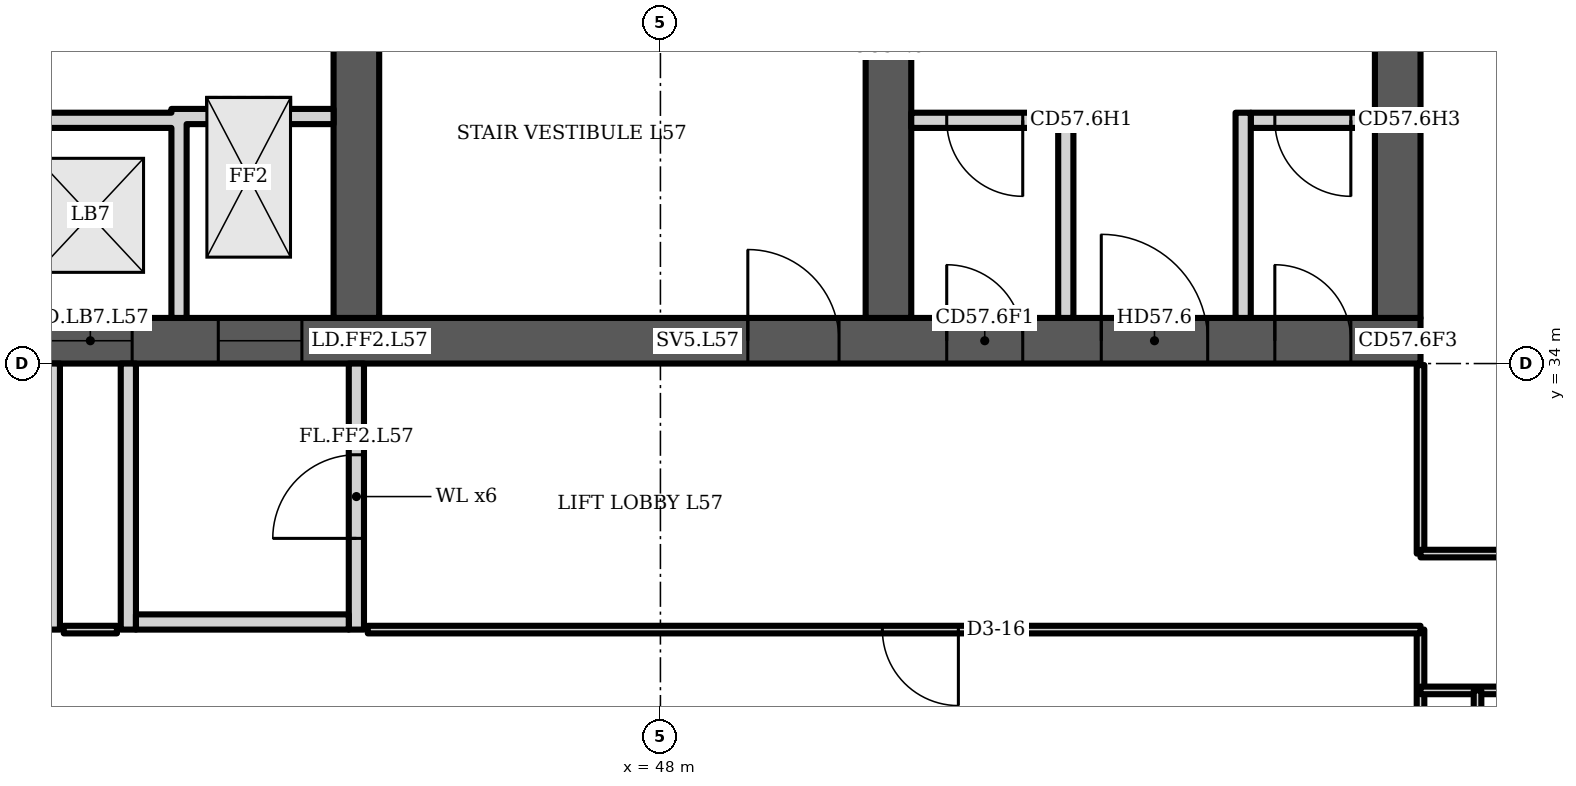
"""IFC4 building model, lengths in metres.
Left out: names, types, materials, properties, quantities, classifications, styles, units other than length and angle.
Written with IfcOpenShell. Run it as: python <this file> out.ifc"""

import sys

from ifc_helpers import new_model, si_unit, direction, frame, frame_2d, origin, place, context, subcontext, project, spatial, polyline, rectangle, outline, extrude, element, fill, save


model = new_model("IFC4")
c1 = context("Model", 3, precision=1e-05, world=origin(), true_north=direction((0.0, 1.0)))
c2 = subcontext(c1, "Body", "Model", "MODEL_VIEW")
j1 = project(units=[si_unit("LENGTHUNIT", "METRE"), si_unit("PLANEANGLEUNIT", "RADIAN")], contexts=[c1])
p1 = place(None, origin())
s1 = spatial("IfcSite", under=j1, at=p1, CompositionType="ELEMENT")
p2 = place(p1, origin())
s2 = spatial("IfcBuilding", under=s1, at=p2, CompositionType="ELEMENT")
p3 = place(p2, frame((0.0, 0.0, 228.7)))
s3 = spatial("IfcBuildingStorey", under=s2, at=p3, CompositionType="ELEMENT", Elevation=228.7)
p4 = place(p3, frame((23.0, 34.3, 0.0), z_axis=(0.0, 0.0, 1.0), x_axis=(1.0, 0.0, 0.0)))
e1 = element("IfcWall", 1, at=p4, inside=s3, PredefinedType="SHEAR", context=c2, shape_type="SweptSolid", body=[
    extrude(rectangle(XDim=35.0, YDim=0.6, at=frame_2d((17.5, 0.0))), origin(), (0.0, 0.0, 1.0), 3.6),
])
p5 = place(p4, frame((0.65, 0.0, 0.0)))
e2 = element("IfcOpeningElement", 2, at=p5, cuts=e1, PredefinedType="OPENING", context=c2, shape_type="SweptSolid", body=[
    extrude(rectangle(XDim=1.2, YDim=2.1, at=frame_2d((0.6, 1.05))), frame((0.0, 0.31, 0.0), z_axis=(0.0, -1.0, 0.0), x_axis=(1.0, 0.0, 0.0)), (0.0, 0.0, 1.0), 0.62),
])
p6 = place(p4, frame((7.717, 0.0, 0.0)))
e3 = element("IfcOpeningElement", 3, at=p6, cuts=e1, PredefinedType="OPENING", context=c2, shape_type="SweptSolid", body=[
    extrude(rectangle(XDim=1.1, YDim=2.1, at=frame_2d((0.55, 1.05))), frame((0.0, 0.31, 0.0), z_axis=(0.0, -1.0, 0.0), x_axis=(1.0, 0.0, 0.0)), (0.0, 0.0, 1.0), 0.62),
])
p7 = place(p4, frame((12.183, 0.0, 0.0)))
e4 = element("IfcOpeningElement", 4, at=p7, cuts=e1, PredefinedType="OPENING", context=c2, shape_type="SweptSolid", body=[
    extrude(rectangle(XDim=1.1, YDim=2.1, at=frame_2d((0.55, 1.05))), frame((0.0, 0.31, 0.0), z_axis=(0.0, -1.0, 0.0), x_axis=(1.0, 0.0, 0.0)), (0.0, 0.0, 1.0), 0.62),
])
p8 = place(p4, frame((9.8, 0.0, 0.0)))
e5 = element("IfcOpeningElement", 5, at=p8, cuts=e1, PredefinedType="OPENING", context=c2, shape_type="SweptSolid", body=[
    extrude(rectangle(XDim=1.4, YDim=2.1, at=frame_2d((0.7, 1.05))), frame((0.0, 0.31, 0.0), z_axis=(0.0, -1.0, 0.0), x_axis=(1.0, 0.0, 0.0)), (0.0, 0.0, 1.0), 0.62),
])
p9 = place(p4, frame((14.717, 0.0, 0.0)))
e6 = element("IfcOpeningElement", 6, at=p9, cuts=e1, PredefinedType="OPENING", context=c2, shape_type="SweptSolid", body=[
    extrude(rectangle(XDim=1.1, YDim=2.1, at=frame_2d((0.55, 1.05))), frame((0.0, 0.31, 0.0), z_axis=(0.0, -1.0, 0.0), x_axis=(1.0, 0.0, 0.0)), (0.0, 0.0, 1.0), 0.62),
])
p10 = place(p4, frame((16.95, 0.0, 0.0)))
e7 = element("IfcOpeningElement", 7, at=p10, cuts=e1, PredefinedType="OPENING", context=c2, shape_type="SweptSolid", body=[
    extrude(rectangle(XDim=1.1, YDim=2.1, at=frame_2d((0.55, 1.05))), frame((0.0, 0.31, 0.0), z_axis=(0.0, -1.0, 0.0), x_axis=(1.0, 0.0, 0.0)), (0.0, 0.0, 1.0), 0.62),
])
p11 = place(p4, frame((19.183, 0.0, 0.0)))
e8 = element("IfcOpeningElement", 8, at=p11, cuts=e1, PredefinedType="OPENING", context=c2, shape_type="SweptSolid", body=[
    extrude(rectangle(XDim=1.1, YDim=2.1, at=frame_2d((0.55, 1.05))), frame((0.0, 0.31, 0.0), z_axis=(0.0, -1.0, 0.0), x_axis=(1.0, 0.0, 0.0)), (0.0, 0.0, 1.0), 0.62),
])
p12 = place(p4, frame((26.15, 0.0, 0.0)))
e9 = element("IfcOpeningElement", 9, at=p12, cuts=e1, PredefinedType="OPENING", context=c2, shape_type="SweptSolid", body=[
    extrude(rectangle(XDim=1.2, YDim=2.1, at=frame_2d((0.6, 1.05))), frame((0.0, 0.31, 0.0), z_axis=(0.0, -1.0, 0.0), x_axis=(1.0, 0.0, 0.0)), (0.0, 0.0, 1.0), 0.62),
])
p13 = place(p4, frame((28.767, 0.0, 0.0)))
e10 = element("IfcOpeningElement", 10, at=p13, cuts=e1, PredefinedType="OPENING", context=c2, shape_type="SweptSolid", body=[
    extrude(rectangle(XDim=1.0, YDim=2.1, at=frame_2d((0.5, 1.05))), frame((0.0, 0.31, 0.0), z_axis=(0.0, -1.0, 0.0), x_axis=(1.0, 0.0, 0.0)), (0.0, 0.0, 1.0), 0.62),
])
p14 = place(p4, frame((33.083, 0.0, 0.0)))
e11 = element("IfcOpeningElement", 11, at=p14, cuts=e1, PredefinedType="OPENING", context=c2, shape_type="SweptSolid", body=[
    extrude(rectangle(XDim=1.0, YDim=2.1, at=frame_2d((0.5, 1.05))), frame((0.0, 0.31, 0.0), z_axis=(0.0, -1.0, 0.0), x_axis=(1.0, 0.0, 0.0)), (0.0, 0.0, 1.0), 0.62),
])
p15 = place(p4, frame((30.8, 0.0, 0.0)))
e12 = element("IfcOpeningElement", 12, at=p15, cuts=e1, PredefinedType="OPENING", context=c2, shape_type="SweptSolid", body=[
    extrude(rectangle(XDim=1.4, YDim=2.1, at=frame_2d((0.7, 1.05))), frame((0.0, 0.31, 0.0), z_axis=(0.0, -1.0, 0.0), x_axis=(1.0, 0.0, 0.0)), (0.0, 0.0, 1.0), 0.62),
])
p16 = place(p3, frame((44.0, 34.6, 0.0), z_axis=(0.0, 0.0, 1.0), x_axis=(0.0, 1.0, 0.0)))
e13 = element("IfcWall", 13, at=p16, inside=s3, PredefinedType="SHEAR", context=c2, shape_type="SweptSolid", body=[
    extrude(rectangle(XDim=14.784, YDim=0.6, at=frame_2d((7.392, 0.0))), origin(), (0.0, 0.0, 1.0), 3.6),
])
p17 = place(p16, frame((11.608, 0.0, 0.0)))
e14 = element("IfcOpeningElement", 14, at=p17, cuts=e13, PredefinedType="OPENING", context=c2, shape_type="SweptSolid", body=[
    extrude(rectangle(XDim=1.0, YDim=2.1, at=frame_2d((0.5, 1.05))), frame((0.0, 0.31, 0.0), z_axis=(0.0, -1.0, 0.0), x_axis=(1.0, 0.0, 0.0)), (0.0, 0.0, 1.0), 0.62),
])
p18 = place(p16, frame((3.8, 0.0, 0.0)))
e15 = element("IfcOpeningElement", 15, at=p18, cuts=e13, PredefinedType="OPENING", context=c2, shape_type="SweptSolid", body=[
    extrude(rectangle(XDim=1.1, YDim=2.1, at=frame_2d((0.55, 1.05))), frame((0.0, 0.31, 0.0), z_axis=(0.0, -1.0, 0.0), x_axis=(1.0, 0.0, 0.0)), (0.0, 0.0, 1.0), 0.62),
])
p19 = place(p3, frame((51.0, 34.6, 0.0), z_axis=(0.0, 0.0, 1.0), x_axis=(0.0, 1.0, 0.0)))
e16 = element("IfcWall", 16, at=p19, inside=s3, PredefinedType="SHEAR", context=c2, shape_type="SweptSolid", body=[
    extrude(rectangle(XDim=14.171, YDim=0.6, at=frame_2d((7.085, 0.0))), origin(), (0.0, 0.0, 1.0), 3.6),
])
p20 = place(p19, frame((3.8, 0.0, 0.0)))
e17 = element("IfcOpeningElement", 17, at=p20, cuts=e16, PredefinedType="OPENING", context=c2, shape_type="SweptSolid", body=[
    extrude(rectangle(XDim=1.1, YDim=2.1, at=frame_2d((0.55, 1.05))), frame((0.0, 0.31, 0.0), z_axis=(0.0, -1.0, 0.0), x_axis=(1.0, 0.0, 0.0)), (0.0, 0.0, 1.0), 0.62),
])
p21 = place(p3, frame((57.7, 34.6, 0.0), z_axis=(0.0, 0.0, 1.0), x_axis=(0.0, 1.0, 0.0)))
e18 = element("IfcWall", 18, at=p21, inside=s3, PredefinedType="SHEAR", context=c2, shape_type="SweptSolid", body=[
    extrude(rectangle(XDim=13.585, YDim=0.6, at=frame_2d((6.792, 0.0))), origin(), (0.0, 0.0, 1.0), 3.6),
])
p22 = place(p3, frame((0.0, 0.0, -0.0)))
e19 = element("IfcWall", 19, at=p22, inside=s3, PredefinedType="PARTITIONING", context=c2, shape_type="SweptSolid", body=[
    extrude(outline(polyline([(41.567, 37.1), (39.433, 37.1), (39.433, 34.6), (39.233, 34.6), (39.233, 37.45), (37.3, 37.45), (37.3, 37.65), (39.233, 37.65), (39.433, 37.65), (39.433, 37.3), (41.567, 37.3), (41.567, 37.35), (41.767, 37.35), (43.7, 37.35), (43.7, 37.15), (41.767, 37.15), (41.767, 34.6), (41.567, 34.6), (41.567, 37.1)])), origin(), (0.0, 0.0, 1.0), 3.2),
])
p23 = place(p3, frame((51.3, 37.2, 0.0), z_axis=(0.0, 0.0, 1.0), x_axis=(1.0, 0.0, 0.0)))
e20 = element("IfcWall", 20, at=p23, inside=s3, PredefinedType="PARTITIONING", context=c2, shape_type="SweptSolid", body=[
    extrude(rectangle(XDim=1.933, YDim=0.2, at=frame_2d((0.967, 0.0))), origin(), (0.0, 0.0, 1.0), 3.2),
])
p24 = place(p23, frame((0.467, 0.0, 0.0)))
e21 = element("IfcOpeningElement", 21, at=p24, cuts=e20, PredefinedType="OPENING", context=c2, shape_type="SweptSolid", body=[
    extrude(rectangle(XDim=1.0, YDim=2.1, at=frame_2d((0.5, 1.05))), frame((0.0, 0.11, 0.0), z_axis=(0.0, -1.0, 0.0), x_axis=(1.0, 0.0, 0.0)), (0.0, 0.0, 1.0), 0.22),
])
p25 = place(p3, frame((55.767, 37.2, 0.0), z_axis=(0.0, 0.0, 1.0), x_axis=(1.0, 0.0, 0.0)))
e22 = element("IfcWall", 22, at=p25, inside=s3, PredefinedType="PARTITIONING", context=c2, shape_type="SweptSolid", body=[
    extrude(rectangle(XDim=1.633, YDim=0.2, at=frame_2d((0.817, 0.0))), origin(), (0.0, 0.0, 1.0), 3.2),
])
p26 = place(p25, frame((0.317, 0.0, 0.0)))
e23 = element("IfcOpeningElement", 23, at=p26, cuts=e22, PredefinedType="OPENING", context=c2, shape_type="SweptSolid", body=[
    extrude(rectangle(XDim=1.0, YDim=2.1, at=frame_2d((0.5, 1.05))), frame((0.0, 0.11, 0.0), z_axis=(0.0, -1.0, 0.0), x_axis=(1.0, 0.0, 0.0)), (0.0, 0.0, 1.0), 0.22),
])
p27 = place(p3, frame((0.0, 0.0, -0.0)))
e24 = element("IfcWall", 24, at=p27, inside=s3, PredefinedType="PARTITIONING", context=c2, shape_type="SweptSolid", body=[
    extrude(outline(polyline([(53.233, 34.6), (53.233, 37.3), (53.433, 37.3), (53.433, 34.6), (53.233, 34.6)])), origin(), (0.0, 0.0, 1.0), 3.2),
])
p28 = place(p3, frame((0.0, 0.0, -0.0)))
e25 = element("IfcWall", 25, at=p28, inside=s3, PredefinedType="PARTITIONING", context=c2, shape_type="SweptSolid", body=[
    extrude(outline(polyline([(55.567, 34.6), (55.567, 37.3), (55.767, 37.3), (55.767, 34.6), (55.567, 34.6)])), origin(), (0.0, 0.0, 1.0), 3.2),
])
for number, where, z_axis, x_axis in (
    (26, (40.0, 30.5, 0.0), (0.0, 0.0, 1.0), (0.0, 1.0, 0.0)),
    (27, (41.0, 30.5, 0.0), (0.0, 0.0, 1.0), (0.0, 1.0, 0.0)),
):
    element("IfcWall", number, at=place(p3, frame(where, z_axis=z_axis, x_axis=x_axis)), inside=s3, PredefinedType="PARTITIONING", context=c2, shape_type="SweptSolid", body=[
        extrude(rectangle(XDim=3.5, YDim=0.2, at=frame_2d((1.75, 0.0))), origin(), (0.0, 0.0, 1.0), 3.2),
    ])
p29 = place(p3, frame((44.0, 30.5, 0.0), z_axis=(0.0, 0.0, 1.0), x_axis=(0.0, 1.0, 0.0)))
e28 = element("IfcWall", 28, at=p29, inside=s3, PredefinedType="PARTITIONING", context=c2, shape_type="SweptSolid", body=[
    extrude(rectangle(XDim=3.5, YDim=0.2, at=frame_2d((1.75, 0.0))), origin(), (0.0, 0.0, 1.0), 3.2),
])
p30 = place(p29, frame((1.2, 0.0, 0.0)))
e29 = element("IfcOpeningElement", 29, at=p30, cuts=e28, PredefinedType="OPENING", context=c2, shape_type="SweptSolid", body=[
    extrude(rectangle(XDim=1.1, YDim=2.1, at=frame_2d((0.55, 1.05))), frame((0.0, 0.11, 0.0), z_axis=(0.0, -1.0, 0.0), x_axis=(1.0, 0.0, 0.0)), (0.0, 0.0, 1.0), 0.22),
])
p31 = place(p3, frame((41.1, 30.6, 0.0), z_axis=(0.0, 0.0, 1.0), x_axis=(1.0, 0.0, 0.0)))
e30 = element("IfcWall", 30, at=p31, inside=s3, PredefinedType="PARTITIONING", context=c2, shape_type="SweptSolid", body=[
    extrude(rectangle(XDim=2.8, YDim=0.2, at=frame_2d((1.4, 0.0))), origin(), (0.0, 0.0, 1.0), 3.2),
])
p32 = place(p3, frame((40.15, 30.5, 0.0), z_axis=(0.0, 0.0, 1.0), x_axis=(1.0, 0.0, 0.0)))
e31 = element("IfcWall", 31, at=p32, inside=s3, PredefinedType="PARTITIONING", context=c2, shape_type="SweptSolid", body=[
    extrude(rectangle(XDim=0.7, YDim=0.1, at=frame_2d((0.35, 0.0))), origin(), (0.0, 0.0, 1.0), 3.2),
])
p33 = place(p3, frame((58.0, 17.0, 0.0), z_axis=(0.0, 0.0, 1.0), x_axis=(0.0, 1.0, 0.0)))
e32 = element("IfcWall", 32, at=p33, inside=s3, PredefinedType="PARTITIONING", context=c2, shape_type="SweptSolid", body=[
    extrude(rectangle(XDim=13.5, YDim=0.1, at=frame_2d((6.75, 0.0))), origin(), (0.0, 0.0, 1.0), 3.2),
])
p34 = place(p3, frame((58.0, 29.7, 0.0), z_axis=(0.0, 0.0, 1.0), x_axis=(1.0, 0.0, 0.0)))
e33 = element("IfcWall", 33, at=p34, inside=s3, PredefinedType="PARTITIONING", context=c2, shape_type="SweptSolid", body=[
    extrude(rectangle(XDim=3.58, YDim=0.1, at=frame_2d((1.79, 0.0))), origin(), (0.0, 0.0, 1.0), 3.2),
])
p35 = place(p3, frame((58.0, 31.5, 0.0), z_axis=(0.0, 0.0, 1.0), x_axis=(0.0, 1.0, 0.0)))
e34 = element("IfcWall", 34, at=p35, inside=s3, PredefinedType="PARTITIONING", context=c2, shape_type="SweptSolid", body=[
    extrude(rectangle(XDim=2.48, YDim=0.1, at=frame_2d((1.24, 0.0))), origin(), (0.0, 0.0, 1.0), 3.2),
])
p36 = place(p3, frame((58.0, 31.5, 0.0), z_axis=(0.0, 0.0, 1.0), x_axis=(1.0, 0.0, 0.0)))
e35 = element("IfcWall", 35, at=p36, inside=s3, PredefinedType="PARTITIONING", context=c2, shape_type="SweptSolid", body=[
    extrude(rectangle(XDim=5.38, YDim=0.1, at=frame_2d((2.69, 0.0))), origin(), (0.0, 0.0, 1.0), 3.2),
])
p37 = place(p36, frame((4.135, 0.0, 0.0)))
e36 = element("IfcOpeningElement", 36, at=p37, cuts=e35, PredefinedType="OPENING", context=c2, shape_type="SweptSolid", body=[
    extrude(rectangle(XDim=1.0, YDim=2.1, at=frame_2d((0.5, 1.05))), frame((0.0, 0.06, 0.0), z_axis=(0.0, -1.0, 0.0), x_axis=(1.0, 0.0, 0.0)), (0.0, 0.0, 1.0), 0.12),
])
p38 = place(p3, frame((58.75, 23.35, 0.0), z_axis=(0.0, 0.0, 1.0), x_axis=(0.0, 1.0, 0.0)))
e37 = element("IfcWall", 37, at=p38, inside=s3, PredefinedType="PARTITIONING", context=c2, shape_type="SweptSolid", body=[
    extrude(rectangle(XDim=6.35, YDim=0.1, at=frame_2d((3.175, 0.0))), origin(), (0.0, 0.0, 1.0), 3.2),
])
p39 = place(p3, frame((44.15, 30.5, 0.0), z_axis=(0.0, 0.0, 1.0), x_axis=(1.0, 0.0, 0.0)))
e38 = element("IfcWall", 38, at=p39, inside=s3, PredefinedType="PARTITIONING", context=c2, shape_type="SweptSolid", body=[
    extrude(rectangle(XDim=13.85, YDim=0.1, at=frame_2d((6.925, 0.0))), origin(), (0.0, 0.0, 1.0), 3.2),
])
p40 = place(p39, frame((6.77, 0.0, 0.0)))
e39 = element("IfcOpeningElement", 39, at=p40, cuts=e38, PredefinedType="OPENING", context=c2, shape_type="SweptSolid", body=[
    extrude(rectangle(XDim=1.0, YDim=2.1, at=frame_2d((0.5, 1.05))), frame((0.0, 0.06, 0.0), z_axis=(0.0, -1.0, 0.0), x_axis=(1.0, 0.0, 0.0)), (0.0, 0.0, 1.0), 0.12),
])
p41 = place(p10, origin())
e40 = element("IfcDoor", 40, at=p41, inside=s3, OperationType="DOUBLE_DOOR_SLIDING", PredefinedType="DOOR", context=c2, shape_type="SweptSolid", body=[
    extrude(rectangle(XDim=1.1, YDim=2.1, at=frame_2d((0.55, 1.05))), frame((0.0, 0.025, 0.0), z_axis=(0.0, -1.0, 0.0), x_axis=(1.0, 0.0, 0.0)), (0.0, 0.0, 1.0), 0.05),
])
fill(e7, e40)
p42 = place(p11, origin())
e41 = element("IfcDoor", 41, at=p42, inside=s3, OperationType="DOUBLE_DOOR_SLIDING", PredefinedType="DOOR", context=c2, shape_type="SweptSolid", body=[
    extrude(rectangle(XDim=1.1, YDim=2.1, at=frame_2d((0.55, 1.05))), frame((0.0, 0.025, 0.0), z_axis=(0.0, -1.0, 0.0), x_axis=(1.0, 0.0, 0.0)), (0.0, 0.0, 1.0), 0.05),
])
fill(e8, e41)
p43 = place(p12, origin())
e42 = element("IfcDoor", 42, at=p43, inside=s3, OperationType="SINGLE_SWING_LEFT", PredefinedType="DOOR", context=c2, shape_type="SweptSolid", body=[
    extrude(rectangle(XDim=1.2, YDim=2.1, at=frame_2d((0.6, 1.05))), frame((0.0, 0.025, 0.0), z_axis=(0.0, -1.0, 0.0), x_axis=(1.0, 0.0, 0.0)), (0.0, 0.0, 1.0), 0.05),
])
fill(e9, e42)
p44 = place(p13, origin())
e43 = element("IfcDoor", 43, at=p44, inside=s3, OperationType="SINGLE_SWING_LEFT", PredefinedType="DOOR", context=c2, shape_type="SweptSolid", body=[
    extrude(rectangle(XDim=1.0, YDim=2.1, at=frame_2d((0.5, 1.05))), frame((0.0, 0.025, 0.0), z_axis=(0.0, -1.0, 0.0), x_axis=(1.0, 0.0, 0.0)), (0.0, 0.0, 1.0), 0.05),
])
fill(e10, e43)
p45 = place(p24, origin())
e44 = element("IfcDoor", 44, at=p45, inside=s3, OperationType="SINGLE_SWING_RIGHT", PredefinedType="DOOR", context=c2, shape_type="SweptSolid", body=[
    extrude(rectangle(XDim=1.0, YDim=2.1, at=frame_2d((0.5, 1.05))), frame((0.0, 0.025, 0.0), z_axis=(0.0, -1.0, 0.0), x_axis=(1.0, 0.0, 0.0)), (0.0, 0.0, 1.0), 0.05),
])
fill(e21, e44)
p46 = place(p14, origin())
e45 = element("IfcDoor", 45, at=p46, inside=s3, OperationType="SINGLE_SWING_LEFT", PredefinedType="DOOR", context=c2, shape_type="SweptSolid", body=[
    extrude(rectangle(XDim=1.0, YDim=2.1, at=frame_2d((0.5, 1.05))), frame((0.0, 0.025, 0.0), z_axis=(0.0, -1.0, 0.0), x_axis=(1.0, 0.0, 0.0)), (0.0, 0.0, 1.0), 0.05),
])
fill(e11, e45)
p47 = place(p26, origin())
e46 = element("IfcDoor", 46, at=p47, inside=s3, OperationType="SINGLE_SWING_RIGHT", PredefinedType="DOOR", context=c2, shape_type="SweptSolid", body=[
    extrude(rectangle(XDim=1.0, YDim=2.1, at=frame_2d((0.5, 1.05))), frame((0.0, 0.025, 0.0), z_axis=(0.0, -1.0, 0.0), x_axis=(1.0, 0.0, 0.0)), (0.0, 0.0, 1.0), 0.05),
])
fill(e23, e46)
p48 = place(p15, origin())
e47 = element("IfcDoor", 47, at=p48, inside=s3, OperationType="DOUBLE_DOOR_SINGLE_SWING", PredefinedType="DOOR", context=c2, shape_type="SweptSolid", body=[
    extrude(rectangle(XDim=1.4, YDim=2.1, at=frame_2d((0.7, 1.05))), frame((0.0, 0.025, 0.0), z_axis=(0.0, -1.0, 0.0), x_axis=(1.0, 0.0, 0.0)), (0.0, 0.0, 1.0), 0.05),
])
fill(e12, e47)
p49 = place(p30, origin())
e48 = element("IfcDoor", 48, at=p49, inside=s3, OperationType="SINGLE_SWING_LEFT", PredefinedType="DOOR", context=c2, shape_type="SweptSolid", body=[
    extrude(rectangle(XDim=1.1, YDim=2.1, at=frame_2d((0.55, 1.05))), frame((0.0, 0.025, 0.0), z_axis=(0.0, -1.0, 0.0), x_axis=(1.0, 0.0, 0.0)), (0.0, 0.0, 1.0), 0.05),
])
fill(e29, e48)
p50 = place(p40, origin())
e49 = element("IfcDoor", 49, at=p50, inside=s3, OperationType="SINGLE_SWING_RIGHT", PredefinedType="DOOR", context=c2, shape_type="SweptSolid", body=[
    extrude(rectangle(XDim=1.0, YDim=2.1, at=frame_2d((0.5, 1.05))), frame((0.0, 0.025, 0.0), z_axis=(0.0, -1.0, 0.0), x_axis=(1.0, 0.0, 0.0)), (0.0, 0.0, 1.0), 0.05),
])
fill(e39, e49)
save(model, sys.argv[1])
